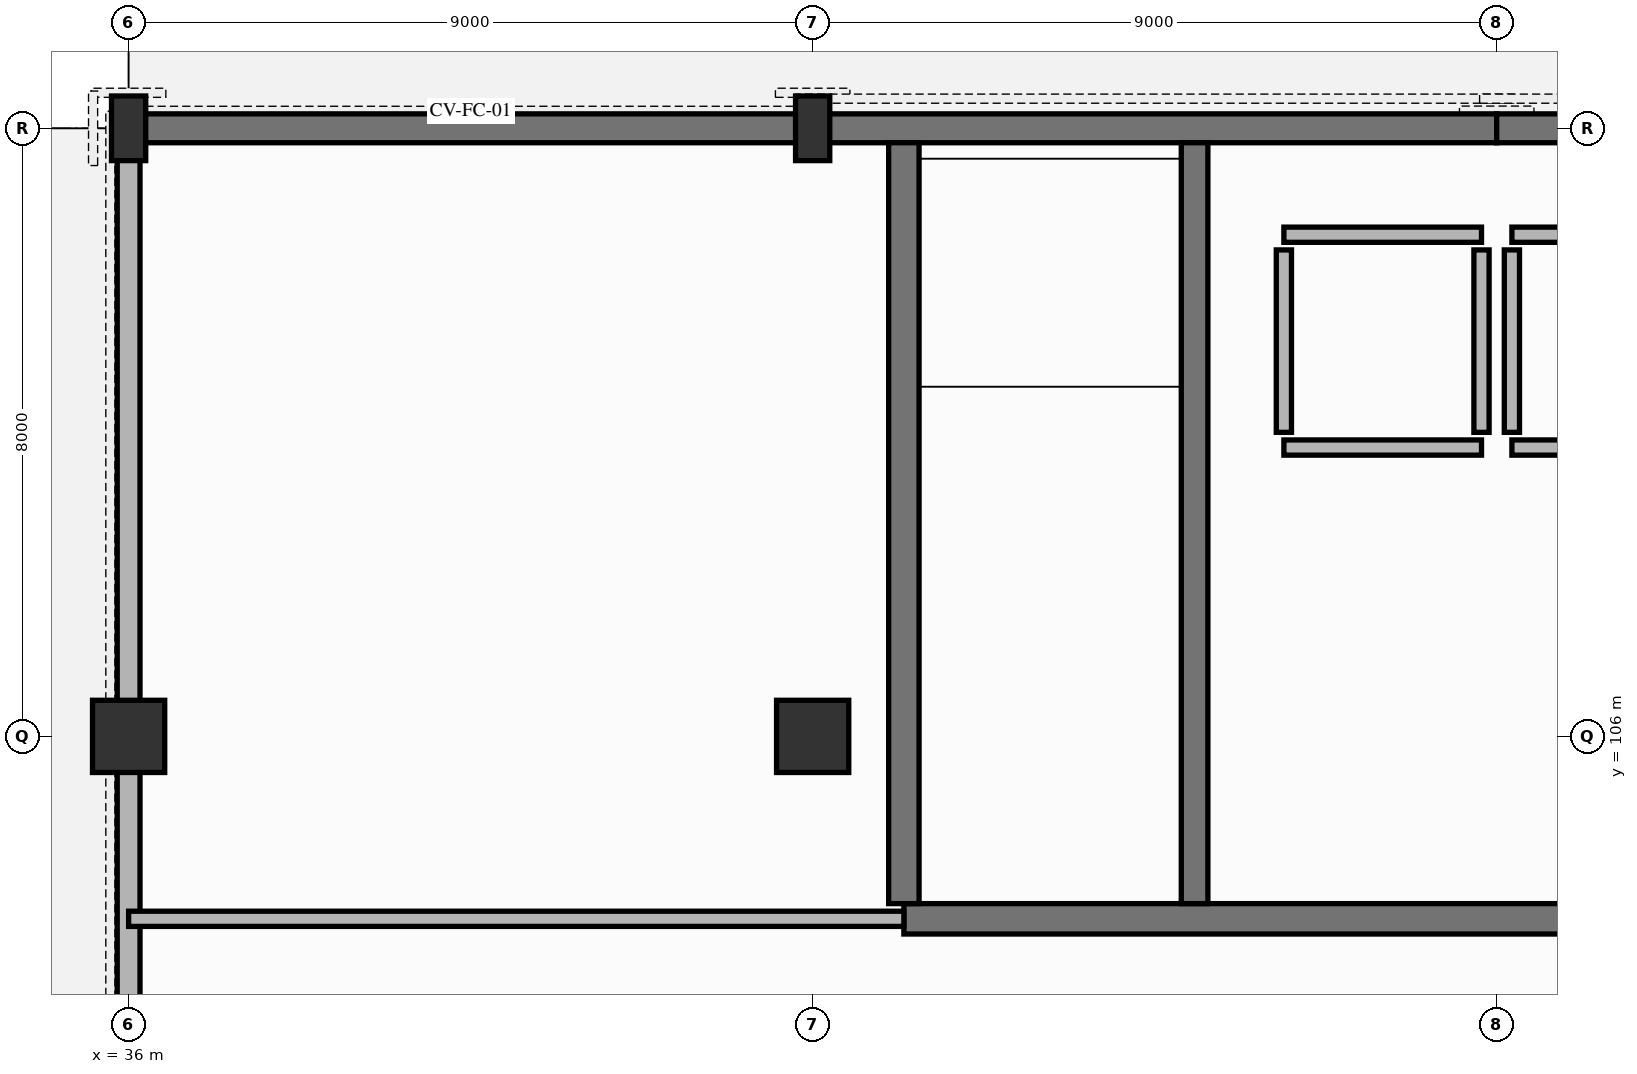
"""IFC4 building model, lengths in metres.
Left out: names, types, materials, properties, quantities, classifications, styles, units other than length and angle.
Written with IfcOpenShell. Run it as: python <this file> out.ifc"""

import sys

from ifc_helpers import new_model, si_unit, direction, frame, frame_2d, origin, origin_2d, place, context, subcontext, project, spatial, rectangle, extrude, element, fill, save


model = new_model("IFC4")
c1 = context("Model", 3, precision=1e-05, world=origin(), true_north=direction((0.0, 1.0)))
c2 = subcontext(c1, "Body", "Model", "MODEL_VIEW")
j1 = project(units=[si_unit("LENGTHUNIT", "METRE"), si_unit("PLANEANGLEUNIT", "RADIAN")], contexts=[c1])
p1 = place(None, origin())
s1 = spatial("IfcSite", under=j1, at=p1, CompositionType="ELEMENT")
p2 = place(p1, origin())
s2 = spatial("IfcBuilding", under=s1, at=p2, CompositionType="ELEMENT")
p3 = place(p2, origin())
s3 = spatial("IfcBuildingStorey", under=s2, at=p3, CompositionType="ELEMENT", Elevation=0.0)
p4 = place(p3, frame((36.0, 106.0, 0.0), z_axis=(0.0, 0.0, 1.0), x_axis=(1.0, 0.0, 0.0)))
e1 = element("IfcColumn", 1, at=p4, inside=s3, PredefinedType="COLUMN", context=c2, shape_type="SweptSolid", body=[
    extrude(rectangle(XDim=0.95, YDim=0.95, at=origin_2d()), origin(), (0.0, 0.0, 1.0), 5.1),
])
p5 = place(p3, frame((36.0, 114.0, 0.0), z_axis=(0.0, 0.0, 1.0), x_axis=(0.0, 1.0, 0.0)))
e2 = element("IfcColumn", 2, at=p5, inside=s3, PredefinedType="COLUMN", context=c2, shape_type="SweptSolid", body=[
    extrude(rectangle(XDim=0.45, YDim=0.85, at=origin_2d()), origin(), (0.0, 0.0, 1.0), 5.1),
])
p6 = place(p3, frame((45.0, 106.0, 0.0), z_axis=(0.0, 0.0, 1.0), x_axis=(1.0, 0.0, 0.0)))
e3 = element("IfcColumn", 3, at=p6, inside=s3, PredefinedType="COLUMN", context=c2, shape_type="SweptSolid", body=[
    extrude(rectangle(XDim=0.95, YDim=0.95, at=origin_2d()), origin(), (0.0, 0.0, 1.0), 5.1),
])
p7 = place(p3, frame((45.0, 114.0, 0.0), z_axis=(0.0, 0.0, 1.0), x_axis=(0.0, 1.0, 0.0)))
e4 = element("IfcColumn", 4, at=p7, inside=s3, PredefinedType="COLUMN", context=c2, shape_type="SweptSolid", body=[
    extrude(rectangle(XDim=0.45, YDim=0.85, at=origin_2d()), origin(), (0.0, 0.0, 1.0), 5.1),
])
p8 = place(p3, frame((36.0, 114.0, 0.0), z_axis=(0.0, 0.0, 1.0), x_axis=(1.0, 0.0, 0.0)))
e5 = element("IfcWall", 5, at=p8, inside=s3, PredefinedType="SOLIDWALL", context=c2, shape_type="SweptSolid", body=[
    extrude(rectangle(XDim=9.0, YDim=0.38, at=frame_2d((4.5, 0.0))), origin(), (0.0, 0.0, 1.0), 4.8),
])
p9 = place(p8, frame((2.2, 0.0, 1.15)))
e6 = element("IfcOpeningElement", 6, at=p9, cuts=e5, PredefinedType="OPENING", context=c2, shape_type="SweptSolid", body=[
    extrude(rectangle(XDim=0.75, YDim=2.2, at=frame_2d((0.375, 1.1))), frame((0.0, 0.2, 0.0), z_axis=(0.0, -1.0, 0.0), x_axis=(1.0, 0.0, 0.0)), (0.0, 0.0, 1.0), 0.4),
])
p10 = place(p8, frame((5.4, 0.0, 1.15)))
e7 = element("IfcOpeningElement", 7, at=p10, cuts=e5, PredefinedType="OPENING", context=c2, shape_type="SweptSolid", body=[
    extrude(rectangle(XDim=0.9, YDim=2.2, at=frame_2d((0.45, 1.1))), frame((0.0, 0.2, 0.0), z_axis=(0.0, -1.0, 0.0), x_axis=(1.0, 0.0, 0.0)), (0.0, 0.0, 1.0), 0.4),
])
p11 = place(p3, frame((45.0, 114.0, 0.0), z_axis=(0.0, 0.0, 1.0), x_axis=(1.0, 0.0, 0.0)))
e8 = element("IfcWall", 8, at=p11, inside=s3, PredefinedType="SOLIDWALL", context=c2, shape_type="SweptSolid", body=[
    extrude(rectangle(XDim=9.0, YDim=0.38, at=frame_2d((4.5, 0.0))), origin(), (0.0, 0.0, 1.0), 4.8),
])
p12 = place(p11, frame((2.4, 0.0, 0.0)))
e9 = element("IfcOpeningElement", 9, at=p12, cuts=e8, PredefinedType="OPENING", context=c2, shape_type="SweptSolid", body=[
    extrude(rectangle(XDim=1.8, YDim=2.4, at=frame_2d((0.9, 1.2))), frame((0.0, 0.2, 0.0), z_axis=(0.0, -1.0, 0.0), x_axis=(1.0, 0.0, 0.0)), (0.0, 0.0, 1.0), 0.4),
])
p13 = place(p3, frame((54.0, 114.0, 0.0), z_axis=(0.0, 0.0, 1.0), x_axis=(1.0, 0.0, 0.0)))
e10 = element("IfcWall", 10, at=p13, inside=s3, PredefinedType="SOLIDWALL", context=c2, shape_type="SweptSolid", body=[
    extrude(rectangle(XDim=9.0, YDim=0.38, at=frame_2d((4.5, 0.0))), origin(), (0.0, 0.0, 1.0), 4.8),
])
p14 = place(p13, frame((2.2, 0.0, 1.15)))
e11 = element("IfcOpeningElement", 11, at=p14, cuts=e10, PredefinedType="OPENING", context=c2, shape_type="SweptSolid", body=[
    extrude(rectangle(XDim=0.75, YDim=2.2, at=frame_2d((0.375, 1.1))), frame((0.0, 0.2, 0.0), z_axis=(0.0, -1.0, 0.0), x_axis=(1.0, 0.0, 0.0)), (0.0, 0.0, 1.0), 0.4),
])
p15 = place(p3, frame((36.0, 82.2, 0.0), z_axis=(0.0, 0.0, 1.0), x_axis=(0.0, 1.0, 0.0)))
e12 = element("IfcWall", 12, at=p15, inside=s3, PredefinedType="SOLIDWALL", context=c2, shape_type="SweptSolid", body=[
    extrude(rectangle(XDim=31.8, YDim=0.3, at=frame_2d((15.9, 0.0))), origin(), (0.0, 0.0, 1.0), 4.095),
])
p16 = place(p15, frame((3.0, 0.0, 0.95)))
e13 = element("IfcOpeningElement", 13, at=p16, cuts=e12, PredefinedType="OPENING", context=c2, shape_type="SweptSolid", body=[
    extrude(rectangle(XDim=1.35, YDim=1.85, at=frame_2d((0.675, 0.925))), frame((0.0, 0.16, 0.0), z_axis=(0.0, -1.0, 0.0), x_axis=(1.0, 0.0, 0.0)), (0.0, 0.0, 1.0), 0.32),
])
p17 = place(p15, frame((9.5, 0.0, 0.95)))
e14 = element("IfcOpeningElement", 14, at=p17, cuts=e12, PredefinedType="OPENING", context=c2, shape_type="SweptSolid", body=[
    extrude(rectangle(XDim=1.05, YDim=1.75, at=frame_2d((0.525, 0.875))), frame((0.0, 0.16, 0.0), z_axis=(0.0, -1.0, 0.0), x_axis=(1.0, 0.0, 0.0)), (0.0, 0.0, 1.0), 0.32),
])
p18 = place(p15, frame((16.5, 0.0, 0.95)))
e15 = element("IfcOpeningElement", 15, at=p18, cuts=e12, PredefinedType="OPENING", context=c2, shape_type="SweptSolid", body=[
    extrude(rectangle(XDim=1.5, YDim=2.1, at=frame_2d((0.75, 1.05))), frame((0.0, 0.16, 0.0), z_axis=(0.0, -1.0, 0.0), x_axis=(1.0, 0.0, 0.0)), (0.0, 0.0, 1.0), 0.32),
])
p19 = place(p3, frame((46.2, 103.6, 0.0), z_axis=(0.0, 0.0, 1.0), x_axis=(1.0, 0.0, 0.0)))
e16 = element("IfcWall", 16, at=p19, inside=s3, PredefinedType="SHEAR", context=c2, shape_type="SweptSolid", body=[
    extrude(rectangle(XDim=13.2, YDim=0.4, at=frame_2d((6.6, 0.0))), origin(), (0.0, 0.0, 1.0), 4.8),
])
p20 = place(p19, frame((5.8, 0.0, 0.0)))
e17 = element("IfcOpeningElement", 17, at=p20, cuts=e16, PredefinedType="OPENING", context=c2, shape_type="SweptSolid", body=[
    extrude(rectangle(XDim=1.5, YDim=2.2, at=frame_2d((0.75, 1.1))), frame((0.0, 0.21, 0.0), z_axis=(0.0, -1.0, 0.0), x_axis=(1.0, 0.0, 0.0)), (0.0, 0.0, 1.0), 0.42),
])
p21 = place(p3, frame((46.2, 103.8, 0.0), z_axis=(0.0, 0.0, 1.0), x_axis=(0.0, 1.0, 0.0)))
e18 = element("IfcWall", 18, at=p21, inside=s3, PredefinedType="SHEAR", context=c2, shape_type="SweptSolid", body=[
    extrude(rectangle(XDim=10.01, YDim=0.4, at=frame_2d((5.005, 0.0))), origin(), (0.0, 0.0, 1.0), 4.8),
])
p22 = place(p3, frame((50.025, 103.8, 0.0), z_axis=(0.0, 0.0, 1.0), x_axis=(0.0, 1.0, 0.0)))
e19 = element("IfcWall", 19, at=p22, inside=s3, PredefinedType="SHEAR", context=c2, shape_type="SweptSolid", body=[
    extrude(rectangle(XDim=10.01, YDim=0.35, at=frame_2d((5.005, 0.0))), origin(), (0.0, 0.0, 1.0), 4.8),
])
p23 = place(p22, frame((0.45, 0.0, 0.0)))
e20 = element("IfcOpeningElement", 20, at=p23, cuts=e19, PredefinedType="OPENING", context=c2, shape_type="SweptSolid", body=[
    extrude(rectangle(XDim=1.05, YDim=2.2, at=frame_2d((0.525, 1.1))), frame((0.0, 0.185, 0.0), z_axis=(0.0, -1.0, 0.0), x_axis=(1.0, 0.0, 0.0)), (0.0, 0.0, 1.0), 0.37),
])
p24 = place(p3, frame((51.2, 109.8, 0.0), z_axis=(0.0, 0.0, 1.0), x_axis=(1.0, 0.0, 0.0)))
e21 = element("IfcWall", 21, at=p24, inside=s3, PredefinedType="PARTITIONING", context=c2, shape_type="SweptSolid", body=[
    extrude(rectangle(XDim=2.6, YDim=0.2, at=frame_2d((1.3, 0.0))), origin(), (0.0, 0.0, 1.0), 4.8),
])
p25 = place(p24, frame((0.75, 0.0, 0.0)))
e22 = element("IfcOpeningElement", 22, at=p25, cuts=e21, PredefinedType="OPENING", context=c2, shape_type="SweptSolid", body=[
    extrude(rectangle(XDim=1.1, YDim=2.15, at=frame_2d((0.55, 1.075))), frame((0.0, 0.11, 0.0), z_axis=(0.0, -1.0, 0.0), x_axis=(1.0, 0.0, 0.0)), (0.0, 0.0, 1.0), 0.22),
])
p26 = place(p3, frame((51.2, 112.6, 0.0), z_axis=(0.0, 0.0, 1.0), x_axis=(1.0, 0.0, 0.0)))
e23 = element("IfcWall", 23, at=p26, inside=s3, PredefinedType="PARTITIONING", context=c2, shape_type="SweptSolid", body=[
    extrude(rectangle(XDim=2.6, YDim=0.2, at=frame_2d((1.3, 0.0))), origin(), (0.0, 0.0, 1.0), 4.8),
])
for number, where, z_axis, x_axis in (
    (24, (51.2, 110.0, 0.0), (0.0, 0.0, 1.0), (0.0, 1.0, 0.0)),
    (25, (53.8, 110.0, 0.0), (0.0, 0.0, 1.0), (0.0, 1.0, 0.0)),
):
    element("IfcWall", number, at=place(p3, frame(where, z_axis=z_axis, x_axis=x_axis)), inside=s3, PredefinedType="PARTITIONING", context=c2, shape_type="SweptSolid", body=[
        extrude(rectangle(XDim=2.4, YDim=0.2, at=frame_2d((1.2, 0.0))), origin(), (0.0, 0.0, 1.0), 4.8),
    ])
p27 = place(p3, frame((54.2, 109.8, 0.0), z_axis=(0.0, 0.0, 1.0), x_axis=(1.0, 0.0, 0.0)))
e26 = element("IfcWall", 26, at=p27, inside=s3, PredefinedType="PARTITIONING", context=c2, shape_type="SweptSolid", body=[
    extrude(rectangle(XDim=2.6, YDim=0.2, at=frame_2d((1.3, 0.0))), origin(), (0.0, 0.0, 1.0), 4.8),
])
p28 = place(p27, frame((0.75, 0.0, 0.0)))
e27 = element("IfcOpeningElement", 27, at=p28, cuts=e26, PredefinedType="OPENING", context=c2, shape_type="SweptSolid", body=[
    extrude(rectangle(XDim=1.1, YDim=2.15, at=frame_2d((0.55, 1.075))), frame((0.0, 0.11, 0.0), z_axis=(0.0, -1.0, 0.0), x_axis=(1.0, 0.0, 0.0)), (0.0, 0.0, 1.0), 0.22),
])
p29 = place(p3, frame((54.2, 112.6, 0.0), z_axis=(0.0, 0.0, 1.0), x_axis=(1.0, 0.0, 0.0)))
e28 = element("IfcWall", 28, at=p29, inside=s3, PredefinedType="PARTITIONING", context=c2, shape_type="SweptSolid", body=[
    extrude(rectangle(XDim=2.6, YDim=0.2, at=frame_2d((1.3, 0.0))), origin(), (0.0, 0.0, 1.0), 4.8),
])
p30 = place(p3, frame((54.2, 110.0, 0.0), z_axis=(0.0, 0.0, 1.0), x_axis=(0.0, 1.0, 0.0)))
e29 = element("IfcWall", 29, at=p30, inside=s3, PredefinedType="PARTITIONING", context=c2, shape_type="SweptSolid", body=[
    extrude(rectangle(XDim=2.4, YDim=0.2, at=frame_2d((1.2, 0.0))), origin(), (0.0, 0.0, 1.0), 4.8),
])
p31 = place(p3, frame((36.0, 103.6, 0.0), z_axis=(0.0, 0.0, 1.0), x_axis=(1.0, 0.0, 0.0)))
e30 = element("IfcWall", 30, at=p31, inside=s3, PredefinedType="PARTITIONING", context=c2, shape_type="SweptSolid", body=[
    extrude(rectangle(XDim=10.2, YDim=0.2, at=frame_2d((5.1, 0.0))), origin(), (0.0, 0.0, 1.0), 4.8),
])
p32 = place(p31, frame((4.2, 0.0, 0.0)))
e31 = element("IfcOpeningElement", 31, at=p32, cuts=e30, PredefinedType="OPENING", context=c2, shape_type="SweptSolid", body=[
    extrude(rectangle(XDim=1.6, YDim=2.2, at=frame_2d((0.8, 1.1))), frame((0.0, 0.11, 0.0), z_axis=(0.0, -1.0, 0.0), x_axis=(1.0, 0.0, 0.0)), (0.0, 0.0, 1.0), 0.22),
])
p33 = place(p9, origin())
e32 = element("IfcWindow", 32, at=p33, inside=s3, PartitioningType="SINGLE_PANEL", PredefinedType="WINDOW", context=c2, shape_type="SweptSolid", body=[
    extrude(rectangle(XDim=0.75, YDim=2.2, at=frame_2d((0.375, 1.1))), frame((0.0, 0.03, 0.0), z_axis=(0.0, -1.0, 0.0), x_axis=(1.0, 0.0, 0.0)), (0.0, 0.0, 1.0), 0.06),
])
fill(e6, e32)
p34 = place(p10, origin())
e33 = element("IfcWindow", 33, at=p34, inside=s3, PartitioningType="SINGLE_PANEL", PredefinedType="WINDOW", context=c2, shape_type="SweptSolid", body=[
    extrude(rectangle(XDim=0.9, YDim=2.2, at=frame_2d((0.45, 1.1))), frame((0.0, 0.03, 0.0), z_axis=(0.0, -1.0, 0.0), x_axis=(1.0, 0.0, 0.0)), (0.0, 0.0, 1.0), 0.06),
])
fill(e7, e33)
p35 = place(p12, origin())
e34 = element("IfcDoor", 34, at=p35, inside=s3, OperationType="DOUBLE_DOOR_SINGLE_SWING", PredefinedType="DOOR", context=c2, shape_type="SweptSolid", body=[
    extrude(rectangle(XDim=1.8, YDim=2.4, at=frame_2d((0.9, 1.2))), frame((0.0, 0.025, 0.0), z_axis=(0.0, -1.0, 0.0), x_axis=(1.0, 0.0, 0.0)), (0.0, 0.0, 1.0), 0.05),
])
fill(e9, e34)
p36 = place(p20, origin())
e35 = element("IfcDoor", 35, at=p36, inside=s3, OperationType="DOUBLE_DOOR_SINGLE_SWING", PredefinedType="DOOR", context=c2, shape_type="SweptSolid", body=[
    extrude(rectangle(XDim=1.5, YDim=2.2, at=frame_2d((0.75, 1.1))), frame((0.0, 0.025, 0.0), z_axis=(0.0, -1.0, 0.0), x_axis=(1.0, 0.0, 0.0)), (0.0, 0.0, 1.0), 0.05),
])
fill(e17, e35)
p37 = place(p23, origin())
e36 = element("IfcDoor", 36, at=p37, inside=s3, OperationType="SINGLE_SWING_LEFT", PredefinedType="DOOR", context=c2, shape_type="SweptSolid", body=[
    extrude(rectangle(XDim=1.05, YDim=2.2, at=frame_2d((0.525, 1.1))), frame((0.0, 0.025, 0.0), z_axis=(0.0, -1.0, 0.0), x_axis=(1.0, 0.0, 0.0)), (0.0, 0.0, 1.0), 0.05),
])
fill(e20, e36)
p38 = place(p25, origin())
e37 = element("IfcDoor", 37, at=p38, inside=s3, OperationType="SLIDING_TO_LEFT", PredefinedType="DOOR", context=c2, shape_type="SweptSolid", body=[
    extrude(rectangle(XDim=1.1, YDim=2.15, at=frame_2d((0.55, 1.075))), frame((0.0, 0.025, 0.0), z_axis=(0.0, -1.0, 0.0), x_axis=(1.0, 0.0, 0.0)), (0.0, 0.0, 1.0), 0.05),
])
fill(e22, e37)
p39 = place(p32, origin())
e38 = element("IfcDoor", 38, at=p39, inside=s3, OperationType="DOUBLE_DOOR_SINGLE_SWING", PredefinedType="DOOR", context=c2, shape_type="SweptSolid", body=[
    extrude(rectangle(XDim=1.6, YDim=2.2, at=frame_2d((0.8, 1.1))), frame((0.0, 0.025, 0.0), z_axis=(0.0, -1.0, 0.0), x_axis=(1.0, 0.0, 0.0)), (0.0, 0.0, 1.0), 0.05),
])
fill(e31, e38)
save(model, sys.argv[1])
